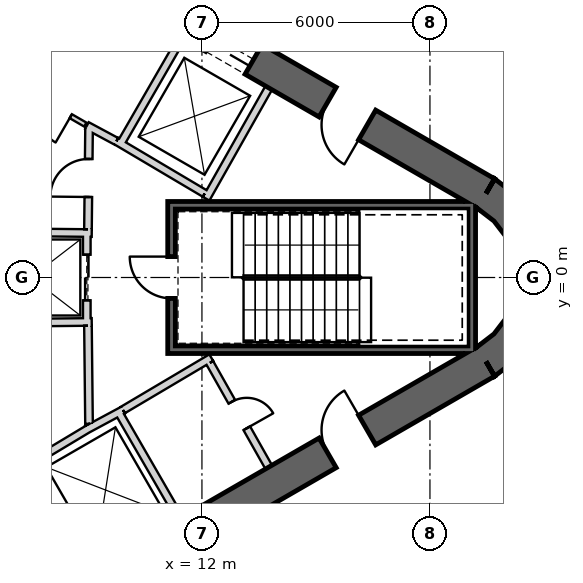
"""IFC4 building model, lengths in metres.
Left out: names, types, materials, properties, quantities, classifications, styles, units other than length and angle.
Written with IfcOpenShell. Run it as: python <this file> out.ifc"""

import sys

from ifc_helpers import new_model, si_unit, direction, frame, frame_2d, origin, place, context, subcontext, project, spatial, polyline, rectangle, outline, extrude, element, fill, save


model = new_model("IFC4")
c1 = context("Model", 3, precision=1e-05, world=origin(), true_north=direction((0.0, 1.0)))
c2 = subcontext(c1, "Body", "Model", "MODEL_VIEW")
j1 = project(units=[si_unit("LENGTHUNIT", "METRE"), si_unit("PLANEANGLEUNIT", "RADIAN")], contexts=[c1])
p1 = place(None, origin())
s1 = spatial("IfcSite", under=j1, at=p1, CompositionType="ELEMENT")
p2 = place(p1, origin())
s2 = spatial("IfcBuilding", under=s1, at=p2, CompositionType="ELEMENT")
p3 = place(p2, frame((0.0, 0.0, 310.4)))
s3 = spatial("IfcBuildingStorey", under=s2, at=p3, CompositionType="ELEMENT", Elevation=310.4)
p4 = place(p3, frame((19.475, 2.208, 0.0), z_axis=(0.0, 0.0, 1.0), x_axis=(-0.866028369851, 0.499994862586, 0.0)))
e1 = element("IfcWall", 1, at=p4, inside=s3, PredefinedType="SHEAR", context=c2, shape_type="SweptSolid", body=[
    extrude(rectangle(XDim=31.523, YDim=0.9, at=frame_2d((15.762, 0.0))), origin(), (0.0, 0.0, 1.0), 3.9),
])
p5 = place(p4, frame((7.062, 0.0, 0.0)))
e2 = element("IfcOpeningElement", 2, at=p5, cuts=e1, PredefinedType="OPENING", context=c2, shape_type="SweptSolid", body=[
    extrude(rectangle(XDim=1.2, YDim=2.4, at=frame_2d((0.6, 1.2))), frame((0.0, 0.46, 0.0), z_axis=(0.0, -1.0, 0.0), x_axis=(1.0, 0.0, 0.0)), (0.0, 0.0, 1.0), 0.92),
])
p6 = place(p4, frame((3.612, 0.0, 0.0)))
e3 = element("IfcOpeningElement", 3, at=p6, cuts=e1, PredefinedType="OPENING", context=c2, shape_type="SweptSolid", body=[
    extrude(rectangle(XDim=1.2, YDim=2.4, at=frame_2d((0.6, 1.2))), frame((0.0, 0.46, 0.0), z_axis=(0.0, -1.0, 0.0), x_axis=(1.0, 0.0, 0.0)), (0.0, 0.0, 1.0), 0.92),
])
p7 = place(p4, frame((26.712, 0.0, 0.0)))
e4 = element("IfcOpeningElement", 4, at=p7, cuts=e1, PredefinedType="OPENING", context=c2, shape_type="SweptSolid", body=[
    extrude(rectangle(XDim=1.2, YDim=2.4, at=frame_2d((0.6, 1.2))), frame((0.0, 0.46, 0.0), z_axis=(0.0, -1.0, 0.0), x_axis=(1.0, 0.0, 0.0)), (0.0, 0.0, 1.0), 0.92),
])
p8 = place(p3, frame((-7.825, -17.97, 0.0), z_axis=(0.0, 0.0, 1.0), x_axis=(0.866028369851, 0.499994862586, 0.0)))
e5 = element("IfcWall", 5, at=p8, inside=s3, PredefinedType="SHEAR", context=c2, shape_type="SweptSolid", body=[
    extrude(rectangle(XDim=31.523, YDim=0.9, at=frame_2d((15.762, 0.0))), origin(), (0.0, 0.0, 1.0), 3.9),
])
p9 = place(p8, frame((17.862, 0.0, 0.0)))
e6 = element("IfcOpeningElement", 6, at=p9, cuts=e5, PredefinedType="OPENING", context=c2, shape_type="SweptSolid", body=[
    extrude(rectangle(XDim=1.2, YDim=2.4, at=frame_2d((0.6, 1.2))), frame((0.0, 0.46, 0.0), z_axis=(0.0, -1.0, 0.0), x_axis=(1.0, 0.0, 0.0)), (0.0, 0.0, 1.0), 0.92),
])
p10 = place(p8, frame((20.562, 0.0, 0.0)))
e7 = element("IfcOpeningElement", 7, at=p10, cuts=e5, PredefinedType="OPENING", context=c2, shape_type="SweptSolid", body=[
    extrude(rectangle(XDim=1.2, YDim=2.4, at=frame_2d((0.6, 1.2))), frame((0.0, 0.46, 0.0), z_axis=(0.0, -1.0, 0.0), x_axis=(1.0, 0.0, 0.0)), (0.0, 0.0, 1.0), 0.92),
])
p11 = place(p8, frame((26.712, 0.0, 0.0)))
e8 = element("IfcOpeningElement", 8, at=p11, cuts=e5, PredefinedType="OPENING", context=c2, shape_type="SweptSolid", body=[
    extrude(rectangle(XDim=1.2, YDim=2.4, at=frame_2d((0.6, 1.2))), frame((0.0, 0.46, 0.0), z_axis=(0.0, -1.0, 0.0), x_axis=(1.0, 0.0, 0.0)), (0.0, 0.0, 1.0), 0.92),
])
p12 = place(p8, frame((3.612, 0.0, 0.0)))
e9 = element("IfcOpeningElement", 9, at=p12, cuts=e5, PredefinedType="OPENING", context=c2, shape_type="SweptSolid", body=[
    extrude(rectangle(XDim=1.2, YDim=2.4, at=frame_2d((0.6, 1.2))), frame((0.0, 0.46, 0.0), z_axis=(0.0, -1.0, 0.0), x_axis=(1.0, 0.0, 0.0)), (0.0, 0.0, 1.0), 0.92),
])
p13 = place(p3, origin())
e10 = element("IfcWall", 10, at=p13, inside=s3, PredefinedType="SHEAR", context=c2, shape_type="SweptSolid", body=[
    extrude(outline(polyline([(19.7, -2.598), (20.321, -2.121), (20.798, -1.5), (21.098, -0.777), (21.2, 0.0), (21.098, 0.777), (20.798, 1.5), (20.321, 2.121), (19.7, 2.598), (19.25, 1.819), (19.685, 1.485), (20.019, 1.05), (20.229, 0.543), (20.3, 0.0), (20.229, -0.543), (20.019, -1.05), (19.685, -1.485), (19.25, -1.819), (19.7, -2.598)])), origin(), (0.0, 0.0, 1.0), 3.9),
])
p14 = place(p3, frame((9.847, 3.495, 0.0), z_axis=(0.0, 0.0, 1.0), x_axis=(0.499984717929, 0.866034226713, 0.0)))
e11 = element("IfcWall", 11, at=p14, inside=s3, PredefinedType="PLUMBINGWALL", context=c2, shape_type="SweptSolid", body=[
    extrude(rectangle(XDim=3.25, YDim=0.2, at=frame_2d((1.625, 0.0))), origin(), (0.0, 0.0, 1.0), 3.6),
])
p15 = place(p3, frame((12.11, 2.073, 0.0), z_axis=(0.0, 0.0, 1.0), x_axis=(0.49196600604, 0.870614408852, 0.0)))
e12 = element("IfcWall", 12, at=p15, inside=s3, PredefinedType="PLUMBINGWALL", context=c2, shape_type="SweptSolid", body=[
    extrude(rectangle(XDim=3.35, YDim=0.2, at=frame_2d((1.675, 0.0))), origin(), (0.0, 0.0, 1.0), 3.6),
])
p16 = place(p3, frame((12.073, 2.211, 0.0), z_axis=(0.0, 0.0, 1.0), x_axis=(-0.860414880418, 0.509594185166, 0.0)))
e13 = element("IfcWall", 13, at=p16, inside=s3, PredefinedType="PLUMBINGWALL", context=c2, shape_type="SweptSolid", body=[
    extrude(rectangle(XDim=2.7, YDim=0.2, at=frame_2d((1.35, 0.0))), origin(), (0.0, 0.0, 1.0), 3.6),
])
p17 = place(p3, frame((9.795, -3.525, 0.0), z_axis=(0.0, 0.0, 1.0), x_axis=(0.499984717929, -0.866034226713, 0.0)))
e14 = element("IfcWall", 14, at=p17, inside=s3, PredefinedType="PLUMBINGWALL", context=c2, shape_type="SweptSolid", body=[
    extrude(rectangle(XDim=3.25, YDim=0.2, at=frame_2d((1.625, 0.0))), origin(), (0.0, 0.0, 1.0), 3.6),
])
p18 = place(p3, frame((8.974, -3.999, 0.0), z_axis=(0.0, 0.0, 1.0), x_axis=(0.880907015104, 0.473289373154, 0.0)))
e15 = element("IfcWall", 15, at=p18, inside=s3, PredefinedType="PLUMBINGWALL", context=c2, shape_type="SweptSolid", body=[
    extrude(rectangle(XDim=1.078, YDim=0.2, at=frame_2d((0.539, 0.0))), origin(), (0.0, 0.0, 1.0), 3.6),
])
p19 = place(p3, frame((7.497, -4.886, 0.0), z_axis=(0.0, 0.0, 1.0), x_axis=(0.857516281273, 0.51445682749, 0.0)))
e16 = element("IfcWall", 16, at=p19, inside=s3, PredefinedType="PLUMBINGWALL", context=c2, shape_type="SweptSolid", body=[
    extrude(rectangle(XDim=1.845, YDim=0.2, at=frame_2d((0.922, 0.0))), origin(), (0.0, 0.0, 1.0), 3.6),
])
p20 = place(p3, frame((19.2, 1.9, -0.3), z_axis=(0.0, 0.0, 1.0), x_axis=(-1.0, 0.0, 0.0)))
e17 = element("IfcWall", 17, at=p20, inside=s3, PredefinedType="SHEAR", context=c2, shape_type="SweptSolid", body=[
    extrude(rectangle(XDim=8.1, YDim=0.2, at=frame_2d((4.05, 0.0))), origin(), (0.0, 0.0, 1.0), 3.9),
])
p21 = place(p3, frame((19.1, -2.0, -0.3), z_axis=(0.0, 0.0, 1.0), x_axis=(0.0, 1.0, 0.0)))
e18 = element("IfcWall", 18, at=p21, inside=s3, PredefinedType="SHEAR", context=c2, shape_type="SweptSolid", body=[
    extrude(rectangle(XDim=3.8, YDim=0.2, at=frame_2d((1.9, 0.0))), origin(), (0.0, 0.0, 1.0), 3.9),
])
p22 = place(p3, frame((11.1, -1.9, -0.3), z_axis=(0.0, 0.0, 1.0), x_axis=(1.0, 0.0, 0.0)))
e19 = element("IfcWall", 19, at=p22, inside=s3, PredefinedType="SHEAR", context=c2, shape_type="SweptSolid", body=[
    extrude(rectangle(XDim=7.9, YDim=0.2, at=frame_2d((3.95, 0.0))), origin(), (0.0, 0.0, 1.0), 3.9),
])
p23 = place(p3, frame((11.2, -1.8, -0.3), z_axis=(0.0, 0.0, 1.0), x_axis=(0.0, 1.0, 0.0)))
e20 = element("IfcWall", 20, at=p23, inside=s3, PredefinedType="SHEAR", context=c2, shape_type="SweptSolid", body=[
    extrude(rectangle(XDim=3.6, YDim=0.2, at=frame_2d((1.8, 0.0))), origin(), (0.0, 0.0, 1.0), 3.9),
])
p24 = place(p23, frame((1.25, 0.0, 0.3)))
e21 = element("IfcOpeningElement", 21, at=p24, cuts=e20, PredefinedType="OPENING", context=c2, shape_type="SweptSolid", body=[
    extrude(rectangle(XDim=1.1, YDim=2.1, at=frame_2d((0.55, 1.05))), frame((0.0, 0.11, 0.0), z_axis=(0.0, -1.0, 0.0), x_axis=(1.0, 0.0, 0.0)), (0.0, 0.0, 1.0), 0.22),
])
p25 = place(p3, frame((8.97, 1.2, 0.0), z_axis=(0.0, 0.0, 1.0), x_axis=(0.0, -1.0, 0.0)))
e22 = element("IfcWall", 22, at=p25, inside=s3, PredefinedType="PLUMBINGWALL", context=c2, shape_type="SweptSolid", body=[
    extrude(rectangle(XDim=2.4, YDim=0.2, at=frame_2d((1.2, 0.0))), origin(), (0.0, 0.0, 1.0), 3.6),
])
p26 = place(p25, frame((0.6, 0.0, 0.0)))
e23 = element("IfcOpeningElement", 23, at=p26, cuts=e22, PredefinedType="OPENING", context=c2, shape_type="SweptSolid", body=[
    extrude(rectangle(XDim=1.2, YDim=2.4, at=frame_2d((0.6, 1.2))), frame((0.0, 0.11, 0.0), z_axis=(0.0, -1.0, 0.0), x_axis=(1.0, 0.0, 0.0)), (0.0, 0.0, 1.0), 0.22),
])
p27 = place(p3, frame((9.1, -1.169, 0.0), z_axis=(0.0, 0.0, 1.0), x_axis=(-0.999949988, -0.010001074852, 0.0)))
e24 = element("IfcWall", 24, at=p27, inside=s3, PredefinedType="PLUMBINGWALL", context=c2, shape_type="SweptSolid", body=[
    extrude(rectangle(XDim=3.1, YDim=0.2, at=frame_2d((1.55, 0.0))), origin(), (0.0, 0.0, 1.0), 3.6),
])
p28 = place(p3, frame((9.1, 1.169, 0.0), z_axis=(0.0, 0.0, 1.0), x_axis=(-0.99994990606, 0.010009264196, 0.0)))
e25 = element("IfcWall", 25, at=p28, inside=s3, PredefinedType="PLUMBINGWALL", context=c2, shape_type="SweptSolid", body=[
    extrude(rectangle(XDim=3.0, YDim=0.2, at=frame_2d((1.5, 0.0))), origin(), (0.0, 0.0, 1.0), 3.6),
])
p29 = place(p3, frame((8.974, 3.999, 0.0), z_axis=(0.0, 0.0, 1.0), x_axis=(0.880917147855, -0.473270513147, 0.0)))
e26 = element("IfcWall", 26, at=p29, inside=s3, PredefinedType="PARTITIONING", context=c2, shape_type="SweptSolid", body=[
    extrude(rectangle(XDim=0.878, YDim=0.2, at=frame_2d((0.439, 0.0))), origin(), (0.0, 0.0, 1.0), 3.6),
])
p30 = place(p3, frame((7.457, 4.875, 0.0), z_axis=(0.0, 0.0, 1.0), x_axis=(0.866027945518, -0.499995597562, 0.0)))
e27 = element("IfcWall", 27, at=p30, inside=s3, PredefinedType="PARTITIONING", context=c2, shape_type="SweptSolid", body=[
    extrude(rectangle(XDim=1.702, YDim=0.12, at=frame_2d((0.851, 0.0))), origin(), (0.0, 0.0, 1.0), 3.6),
])
p31 = place(p30, frame((0.461, 0.0, 0.0)))
e28 = element("IfcOpeningElement", 28, at=p31, cuts=e27, PredefinedType="OPENING", context=c2, shape_type="SweptSolid", body=[
    extrude(rectangle(XDim=0.8, YDim=2.1, at=frame_2d((0.4, 1.05))), frame((0.0, 0.07, 0.0), z_axis=(0.0, -1.0, 0.0), x_axis=(1.0, 0.0, 0.0)), (0.0, 0.0, 1.0), 0.14),
])
p32 = place(p3, frame((12.245, -2.109, 0.0), z_axis=(0.0, 0.0, 1.0), x_axis=(-0.860414880418, -0.509594185166, 0.0)))
e29 = element("IfcWall", 29, at=p32, inside=s3, PredefinedType="PARTITIONING", context=c2, shape_type="SweptSolid", body=[
    extrude(rectangle(XDim=2.7, YDim=0.2, at=frame_2d((1.35, 0.0))), origin(), (0.0, 0.0, 1.0), 3.6),
])
p33 = place(p3, frame((13.758, -4.99, 0.0), z_axis=(0.0, 0.0, 1.0), x_axis=(-0.491993409184, 0.87059892334, 0.0)))
e30 = element("IfcWall", 30, at=p33, inside=s3, PredefinedType="PARTITIONING", context=c2, shape_type="SweptSolid", body=[
    extrude(rectangle(XDim=3.15, YDim=0.2, at=frame_2d((1.575, 0.0))), origin(), (0.0, 0.0, 1.0), 3.6),
])
p34 = place(p33, frame((1.175, 0.0, 0.0)))
e31 = element("IfcOpeningElement", 31, at=p34, cuts=e30, PredefinedType="OPENING", context=c2, shape_type="SweptSolid", body=[
    extrude(rectangle(XDim=0.8, YDim=2.1, at=frame_2d((0.4, 1.05))), frame((0.0, 0.11, 0.0), z_axis=(0.0, -1.0, 0.0), x_axis=(1.0, 0.0, 0.0)), (0.0, 0.0, 1.0), 0.22),
])
p35 = place(p3, frame((9.029, -3.851, 0.0), z_axis=(0.0, 0.0, 1.0), x_axis=(-0.010784614026, 0.999941844359, 0.0)))
e32 = element("IfcWall", 32, at=p35, inside=s3, PredefinedType="PARTITIONING", context=c2, shape_type="SweptSolid", body=[
    extrude(rectangle(XDim=2.581, YDim=0.2, at=frame_2d((1.291, 0.0))), origin(), (0.0, 0.0, 1.0), 3.6),
])
p36 = place(p3, frame((9.001, 1.27, 0.0), z_axis=(0.0, 0.0, 1.0), x_axis=(0.010723968736, 0.999942496594, 0.0)))
e33 = element("IfcWall", 33, at=p36, inside=s3, PredefinedType="PARTITIONING", context=c2, shape_type="SweptSolid", body=[
    extrude(rectangle(XDim=2.709, YDim=0.2, at=frame_2d((1.354, 0.0))), origin(), (0.0, 0.0, 1.0), 3.6),
])
p37 = place(p36, frame((0.848, 0.0, 0.0)))
e34 = element("IfcOpeningElement", 34, at=p37, cuts=e33, PredefinedType="OPENING", context=c2, shape_type="SweptSolid", body=[
    extrude(rectangle(XDim=1.0, YDim=2.1, at=frame_2d((0.5, 1.05))), frame((0.0, 0.11, 0.0), z_axis=(0.0, -1.0, 0.0), x_axis=(1.0, 0.0, 0.0)), (0.0, 0.0, 1.0), 0.22),
])
p38 = place(p3, frame((22.074, 5.153, 0.0), z_axis=(0.0, 0.0, 1.0), x_axis=(-0.866024844342, 0.500000968981, 0.0)))
e35 = element("IfcWall", 35, at=p38, inside=s3, PredefinedType="PARTITIONING", context=c2, shape_type="SweptSolid", body=[
    extrude(rectangle(XDim=17.073, YDim=0.2, at=frame_2d((8.536, 0.0))), origin(), (0.0, 0.0, 1.0), 2.88),
])
p39 = place(p38, frame((8.075, 0.0, 0.0)))
e36 = element("IfcOpeningElement", 36, at=p39, cuts=e35, PredefinedType="OPENING", context=c2, shape_type="SweptSolid", body=[
    extrude(rectangle(XDim=1.0, YDim=2.1, at=frame_2d((0.5, 1.05))), frame((0.0, 0.11, 0.0), z_axis=(0.0, -1.0, 0.0), x_axis=(1.0, 0.0, 0.0)), (0.0, 0.0, 1.0), 0.22),
])
p40 = place(p3, frame((15.152, -9.381, 0.0), z_axis=(0.0, 0.0, 1.0), x_axis=(0.866019759539, 0.500009775993, 0.0)))
e37 = element("IfcWall", 37, at=p40, inside=s3, PredefinedType="PARTITIONING", context=c2, shape_type="SweptSolid", body=[
    extrude(rectangle(XDim=7.944, YDim=0.2, at=frame_2d((3.972, 0.0))), origin(), (0.0, 0.0, 1.0), 2.88),
])
p41 = place(p40, frame((3.472, 0.0, 0.0)))
e38 = element("IfcOpeningElement", 38, at=p41, cuts=e37, PredefinedType="OPENING", context=c2, shape_type="SweptSolid", body=[
    extrude(rectangle(XDim=1.0, YDim=2.1, at=frame_2d((0.5, 1.05))), frame((0.0, 0.11, 0.0), z_axis=(0.0, -1.0, 0.0), x_axis=(1.0, 0.0, 0.0)), (0.0, 0.0, 1.0), 0.22),
])
p42 = place(p24, origin())
e39 = element("IfcDoor", 39, at=p42, inside=s3, OperationType="SINGLE_SWING_LEFT", PredefinedType="USERDEFINED", context=c2, shape_type="SweptSolid", body=[
    extrude(rectangle(XDim=1.1, YDim=2.1, at=frame_2d((0.55, 1.05))), frame((0.0, 0.025, 0.0), z_axis=(0.0, -1.0, 0.0), x_axis=(1.0, 0.0, 0.0)), (0.0, 0.0, 1.0), 0.05),
])
fill(e21, e39)
p43 = place(p37, origin())
e40 = element("IfcDoor", 40, at=p43, inside=s3, OperationType="SINGLE_SWING_LEFT", PredefinedType="USERDEFINED", context=c2, shape_type="SweptSolid", body=[
    extrude(rectangle(XDim=1.0, YDim=2.1, at=frame_2d((0.5, 1.05))), frame((0.0, 0.025, 0.0), z_axis=(0.0, -1.0, 0.0), x_axis=(1.0, 0.0, 0.0)), (0.0, 0.0, 1.0), 0.05),
])
fill(e34, e40)
p44 = place(p26, origin())
e41 = element("IfcDoor", 41, at=p44, inside=s3, OperationType="SLIDING_TO_LEFT", PredefinedType="USERDEFINED", context=c2, shape_type="SweptSolid", body=[
    extrude(rectangle(XDim=1.2, YDim=2.4, at=frame_2d((0.6, 1.2))), frame((0.0, 0.025, 0.0), z_axis=(0.0, -1.0, 0.0), x_axis=(1.0, 0.0, 0.0)), (0.0, 0.0, 1.0), 0.05),
])
fill(e23, e41)
p45 = place(p31, origin())
e42 = element("IfcDoor", 42, at=p45, inside=s3, OperationType="SINGLE_SWING_LEFT", PredefinedType="USERDEFINED", context=c2, shape_type="SweptSolid", body=[
    extrude(rectangle(XDim=0.8, YDim=2.1, at=frame_2d((0.4, 1.05))), frame((0.0, 0.025, 0.0), z_axis=(0.0, -1.0, 0.0), x_axis=(1.0, 0.0, 0.0)), (0.0, 0.0, 1.0), 0.05),
])
fill(e28, e42)
p46 = place(p34, origin())
e43 = element("IfcDoor", 43, at=p46, inside=s3, OperationType="SINGLE_SWING_RIGHT", PredefinedType="USERDEFINED", context=c2, shape_type="SweptSolid", body=[
    extrude(rectangle(XDim=0.8, YDim=2.1, at=frame_2d((0.4, 1.05))), frame((0.0, 0.025, 0.0), z_axis=(0.0, -1.0, 0.0), x_axis=(1.0, 0.0, 0.0)), (0.0, 0.0, 1.0), 0.05),
])
fill(e31, e43)
p47 = place(p5, origin())
e44 = element("IfcDoor", 44, at=p47, inside=s3, OperationType="SLIDING_TO_LEFT", PredefinedType="USERDEFINED", context=c2, shape_type="SweptSolid", body=[
    extrude(rectangle(XDim=1.2, YDim=2.4, at=frame_2d((0.6, 1.2))), frame((0.0, 0.025, 0.0), z_axis=(0.0, -1.0, 0.0), x_axis=(1.0, 0.0, 0.0)), (0.0, 0.0, 1.0), 0.05),
])
fill(e2, e44)
p48 = place(p11, origin())
e45 = element("IfcDoor", 45, at=p48, inside=s3, OperationType="SINGLE_SWING_LEFT", PredefinedType="USERDEFINED", context=c2, shape_type="SweptSolid", body=[
    extrude(rectangle(XDim=1.2, YDim=2.4, at=frame_2d((0.6, 1.2))), frame((0.0, 0.025, 0.0), z_axis=(0.0, -1.0, 0.0), x_axis=(1.0, 0.0, 0.0)), (0.0, 0.0, 1.0), 0.05),
])
fill(e8, e45)
p49 = place(p6, origin())
e46 = element("IfcDoor", 46, at=p49, inside=s3, OperationType="SINGLE_SWING_RIGHT", PredefinedType="USERDEFINED", context=c2, shape_type="SweptSolid", body=[
    extrude(rectangle(XDim=1.2, YDim=2.4, at=frame_2d((0.6, 1.2))), frame((0.0, 0.025, 0.0), z_axis=(0.0, -1.0, 0.0), x_axis=(1.0, 0.0, 0.0)), (0.0, 0.0, 1.0), 0.05),
])
fill(e3, e46)
save(model, sys.argv[1])
